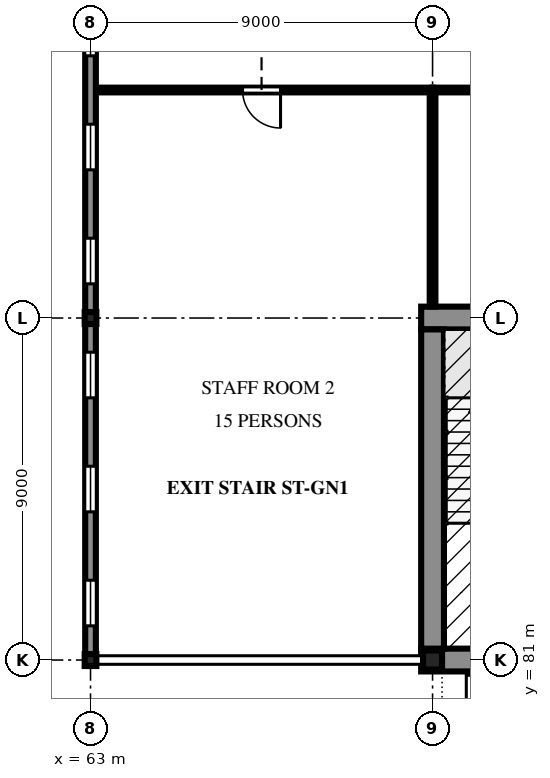
"""IFC4 building model, lengths in metres.
Left out: names, types, materials, properties, quantities, classifications, styles, units other than length and angle.
Written with IfcOpenShell. Run it as: python <this file> out.ifc"""

import sys

from ifc_helpers import new_model, si_unit, direction, frame, frame_2d, origin, origin_2d, place, context, subcontext, project, spatial, polyline, rectangle, hollow_rectangle, i_section, outline, extrude, element, fill, save


model = new_model("IFC4")
c1 = context("Model", 3, precision=1e-05, world=origin(), true_north=direction((0.0, 1.0)))
c2 = subcontext(c1, "Body", "Model", "MODEL_VIEW")
j1 = project(units=[si_unit("LENGTHUNIT", "METRE"), si_unit("PLANEANGLEUNIT", "RADIAN")], contexts=[c1])
p1 = place(None, origin())
s1 = spatial("IfcSite", under=j1, at=p1, CompositionType="ELEMENT")
p2 = place(p1, origin())
s2 = spatial("IfcBuilding", under=s1, at=p2, CompositionType="ELEMENT")
p3 = place(p2, frame((0.0, 0.0, 7.5)))
s3 = spatial("IfcBuildingStorey", under=s2, at=p3, CompositionType="ELEMENT", Elevation=7.5)
for number, where, z_axis, x_axis in (
    (1, (63.0, 81.0, 0.0), (0.0, 0.0, 1.0), (1.0, 0.0, 0.0)),
    (2, (63.0, 90.0, 0.0), (0.0, 0.0, 1.0), (1.0, 0.0, 0.0)),
):
    element("IfcColumn", number, at=place(p3, frame(where, z_axis=z_axis, x_axis=x_axis)), inside=s3, PredefinedType="COLUMN", context=c2, shape_type="SweptSolid", body=[
        extrude(i_section(OverallWidth=0.307, OverallDepth=0.314, WebThickness=0.012, FlangeThickness=0.019, FilletRadius=0.015, at=origin_2d()), origin(), (0.0, 0.0, 1.0), 4.2),
    ])
p4 = place(p3, frame((72.0, 81.0, 0.0), z_axis=(0.0, 0.0, 1.0), x_axis=(1.0, 0.0, 0.0)))
e3 = element("IfcColumn", 3, at=p4, inside=s3, PredefinedType="COLUMN", context=c2, shape_type="SweptSolid", body=[
    extrude(hollow_rectangle(XDim=0.5, YDim=0.5, WallThickness=0.032, at=origin_2d()), origin(), (0.0, 0.0, 1.0), 4.2),
])
p5 = place(p3, frame((71.7, 81.0, 0.0), z_axis=(0.0, 0.0, 1.0), x_axis=(1.0, 0.0, 0.0)))
e4 = element("IfcWall", 4, at=p5, inside=s3, PredefinedType="SOLIDWALL", context=c2, shape_type="SweptSolid", body=[
    extrude(rectangle(XDim=18.6, YDim=0.6, at=frame_2d((9.3, 0.0))), origin(), (0.0, 0.0, 1.0), 4.2),
])
p6 = place(p5, frame((1.6, 0.0, 0.0)))
e5 = element("IfcOpeningElement", 5, at=p6, cuts=e4, PredefinedType="OPENING", context=c2, shape_type="SweptSolid", body=[
    extrude(rectangle(XDim=1.8, YDim=2.1, at=frame_2d((0.9, 1.05))), frame((0.0, 0.31, 0.0), z_axis=(0.0, -1.0, 0.0), x_axis=(1.0, 0.0, 0.0)), (0.0, 0.0, 1.0), 0.62),
])
p7 = place(p5, frame((5.6, 0.0, 0.0)))
e6 = element("IfcOpeningElement", 6, at=p7, cuts=e4, PredefinedType="OPENING", context=c2, shape_type="SweptSolid", body=[
    extrude(rectangle(XDim=1.8, YDim=2.1, at=frame_2d((0.9, 1.05))), frame((0.0, 0.31, 0.0), z_axis=(0.0, -1.0, 0.0), x_axis=(1.0, 0.0, 0.0)), (0.0, 0.0, 1.0), 0.62),
])
p8 = place(p5, frame((9.1, 0.0, 0.0)))
e7 = element("IfcOpeningElement", 7, at=p8, cuts=e4, PredefinedType="OPENING", context=c2, shape_type="SweptSolid", body=[
    extrude(rectangle(XDim=1.8, YDim=2.1, at=frame_2d((0.9, 1.05))), frame((0.0, 0.31, 0.0), z_axis=(0.0, -1.0, 0.0), x_axis=(1.0, 0.0, 0.0)), (0.0, 0.0, 1.0), 0.62),
])
p9 = place(p3, frame((71.7, 90.0, 0.0), z_axis=(0.0, 0.0, 1.0), x_axis=(1.0, 0.0, 0.0)))
e8 = element("IfcWall", 8, at=p9, inside=s3, PredefinedType="SOLIDWALL", context=c2, shape_type="SweptSolid", body=[
    extrude(rectangle(XDim=18.6, YDim=0.6, at=frame_2d((9.3, 0.0))), origin(), (0.0, 0.0, 1.0), 4.2),
])
p10 = place(p3, frame((72.0, 81.3, 0.0), z_axis=(0.0, 0.0, 1.0), x_axis=(0.0, 1.0, 0.0)))
e9 = element("IfcWall", 9, at=p10, inside=s3, PredefinedType="SOLIDWALL", context=c2, shape_type="SweptSolid", body=[
    extrude(rectangle(XDim=8.4, YDim=0.6, at=frame_2d((4.2, 0.0))), origin(), (0.0, 0.0, 1.0), 4.2),
])
p11 = place(p3, frame((63.0, 81.157, 0.0), z_axis=(0.0, 0.0, 1.0), x_axis=(0.0, 1.0, 0.0)))
e10 = element("IfcWall", 10, at=p11, inside=s3, PredefinedType="SOLIDWALL", context=c2, shape_type="SweptSolid", body=[
    extrude(rectangle(XDim=8.686, YDim=0.28, at=frame_2d((4.343, 0.0))), origin(), (0.0, 0.0, 1.0), 3.517),
])
p12 = place(p11, frame((0.743, 0.0, 0.9)))
e11 = element("IfcOpeningElement", 11, at=p12, cuts=e10, PredefinedType="OPENING", context=c2, shape_type="SweptSolid", body=[
    extrude(rectangle(XDim=1.2, YDim=2.4, at=frame_2d((0.6, 1.2))), frame((0.0, 0.15, 0.0), z_axis=(0.0, -1.0, 0.0), x_axis=(1.0, 0.0, 0.0)), (0.0, 0.0, 1.0), 0.3),
])
p13 = place(p11, frame((3.743, 0.0, 0.9)))
e12 = element("IfcOpeningElement", 12, at=p13, cuts=e10, PredefinedType="OPENING", context=c2, shape_type="SweptSolid", body=[
    extrude(rectangle(XDim=1.2, YDim=2.4, at=frame_2d((0.6, 1.2))), frame((0.0, 0.15, 0.0), z_axis=(0.0, -1.0, 0.0), x_axis=(1.0, 0.0, 0.0)), (0.0, 0.0, 1.0), 0.3),
])
p14 = place(p11, frame((6.743, 0.0, 0.9)))
e13 = element("IfcOpeningElement", 13, at=p14, cuts=e10, PredefinedType="OPENING", context=c2, shape_type="SweptSolid", body=[
    extrude(rectangle(XDim=1.2, YDim=2.4, at=frame_2d((0.6, 1.2))), frame((0.0, 0.15, 0.0), z_axis=(0.0, -1.0, 0.0), x_axis=(1.0, 0.0, 0.0)), (0.0, 0.0, 1.0), 0.3),
])
p15 = place(p3, frame((63.0, 90.157, 0.0), z_axis=(0.0, 0.0, 1.0), x_axis=(0.0, 1.0, 0.0)))
e14 = element("IfcWall", 14, at=p15, inside=s3, PredefinedType="SOLIDWALL", context=c2, shape_type="SweptSolid", body=[
    extrude(rectangle(XDim=8.686, YDim=0.28, at=frame_2d((4.343, 0.0))), origin(), (0.0, 0.0, 1.0), 3.517),
])
p16 = place(p15, frame((0.743, 0.0, 0.9)))
e15 = element("IfcOpeningElement", 15, at=p16, cuts=e14, PredefinedType="OPENING", context=c2, shape_type="SweptSolid", body=[
    extrude(rectangle(XDim=1.2, YDim=2.4, at=frame_2d((0.6, 1.2))), frame((0.0, 0.15, 0.0), z_axis=(0.0, -1.0, 0.0), x_axis=(1.0, 0.0, 0.0)), (0.0, 0.0, 1.0), 0.3),
])
p17 = place(p15, frame((3.743, 0.0, 0.9)))
e16 = element("IfcOpeningElement", 16, at=p17, cuts=e14, PredefinedType="OPENING", context=c2, shape_type="SweptSolid", body=[
    extrude(rectangle(XDim=1.2, YDim=2.4, at=frame_2d((0.6, 1.2))), frame((0.0, 0.15, 0.0), z_axis=(0.0, -1.0, 0.0), x_axis=(1.0, 0.0, 0.0)), (0.0, 0.0, 1.0), 0.3),
])
p18 = place(p15, frame((6.743, 0.0, 0.9)))
e17 = element("IfcOpeningElement", 17, at=p18, cuts=e14, PredefinedType="OPENING", context=c2, shape_type="SweptSolid", body=[
    extrude(rectangle(XDim=1.2, YDim=2.4, at=frame_2d((0.6, 1.2))), frame((0.0, 0.15, 0.0), z_axis=(0.0, -1.0, 0.0), x_axis=(1.0, 0.0, 0.0)), (0.0, 0.0, 1.0), 0.3),
])
p19 = place(p3, frame((72.0, 96.0, 0.0), z_axis=(0.0, 0.0, 1.0), x_axis=(-1.0, 0.0, 0.0)))
e18 = element("IfcWall", 18, at=p19, inside=s3, PredefinedType="PARTITIONING", context=c2, shape_type="SweptSolid", body=[
    extrude(rectangle(XDim=8.858, YDim=0.125, at=frame_2d((4.429, 0.0))), origin(), (0.0, 0.0, 1.0), 3.307),
])
p20 = place(p19, frame((4.0, 0.0, 0.0)))
e19 = element("IfcOpeningElement", 19, at=p20, cuts=e18, PredefinedType="OPENING", context=c2, shape_type="SweptSolid", body=[
    extrude(rectangle(XDim=1.0, YDim=2.1, at=frame_2d((0.5, 1.05))), frame((0.0, 0.073, 0.0), z_axis=(0.0, -1.0, 0.0), x_axis=(1.0, 0.0, 0.0)), (0.0, 0.0, 1.0), 0.145),
])
p21 = place(p3, frame((81.0, 96.0, 0.0), z_axis=(0.0, 0.0, 1.0), x_axis=(-1.0, 0.0, 0.0)))
e20 = element("IfcWall", 20, at=p21, inside=s3, PredefinedType="PARTITIONING", context=c2, shape_type="SweptSolid", body=[
    extrude(rectangle(XDim=9.0, YDim=0.125, at=frame_2d((4.5, 0.0))), origin(), (0.0, 0.0, 1.0), 3.307),
])
p22 = place(p21, frame((4.0, 0.0, 0.0)))
e21 = element("IfcOpeningElement", 21, at=p22, cuts=e20, PredefinedType="OPENING", context=c2, shape_type="SweptSolid", body=[
    extrude(rectangle(XDim=1.0, YDim=2.1, at=frame_2d((0.5, 1.05))), frame((0.0, 0.073, 0.0), z_axis=(0.0, -1.0, 0.0), x_axis=(1.0, 0.0, 0.0)), (0.0, 0.0, 1.0), 0.145),
])
p23 = place(p3, frame((72.0, 95.938, 0.0), z_axis=(0.0, 0.0, 1.0), x_axis=(0.0, -1.0, 0.0)))
e22 = element("IfcWall", 22, at=p23, inside=s3, PredefinedType="PARTITIONING", context=c2, shape_type="SweptSolid", body=[
    extrude(rectangle(XDim=5.635, YDim=0.15, at=frame_2d((2.818, 0.0))), origin(), (0.0, 0.0, 1.0), 3.307),
])
p24 = place(p12, origin())
e23 = element("IfcWindow", 23, at=p24, inside=s3, PartitioningType="DOUBLE_PANEL_HORIZONTAL", PredefinedType="WINDOW", context=c2, shape_type="SweptSolid", body=[
    extrude(outline(polyline([(0.0, 0.0), (1.2, 0.0), (1.2, 2.4), (0.0, 2.4), (0.0, 0.0)]), holes=[polyline([(0.07, 0.07), (1.13, 0.07), (1.13, 2.33), (0.07, 2.33), (0.07, 0.07)])]), frame((0.0, 0.03, 0.0), z_axis=(0.0, -1.0, 0.0), x_axis=(1.0, 0.0, 0.0)), (0.0, 0.0, 1.0), 0.06),
    extrude(rectangle(XDim=1.06, YDim=0.04, at=frame_2d((0.6, 1.2))), frame((0.0, 0.021, 0.0), z_axis=(0.0, -1.0, 0.0), x_axis=(1.0, 0.0, 0.0)), (0.0, 0.0, 1.0), 0.043),
    extrude(outline(polyline([(0.07, 0.07), (1.13, 0.07), (1.13, 1.18), (0.07, 1.18), (0.07, 0.07)]), holes=[polyline([(0.1, 0.1), (1.1, 0.1), (1.1, 1.15), (0.1, 1.15), (0.1, 0.1)])]), frame((0.0, 0.022, 0.0), z_axis=(0.0, -1.0, 0.0), x_axis=(1.0, 0.0, 0.0)), (0.0, 0.0, 1.0), 0.045),
    extrude(rectangle(XDim=1.0, YDim=1.05, at=frame_2d((0.6, 0.625))), frame((0.0, 0.006, 0.0), z_axis=(0.0, -1.0, 0.0), x_axis=(1.0, 0.0, 0.0)), (0.0, 0.0, 1.0), 0.012),
    extrude(outline(polyline([(0.07, 1.22), (1.13, 1.22), (1.13, 2.33), (0.07, 2.33), (0.07, 1.22)]), holes=[polyline([(0.1, 1.25), (1.1, 1.25), (1.1, 2.3), (0.1, 2.3), (0.1, 1.25)])]), frame((0.0, 0.022, 0.0), z_axis=(0.0, -1.0, 0.0), x_axis=(1.0, 0.0, 0.0)), (0.0, 0.0, 1.0), 0.045),
    extrude(rectangle(XDim=1.0, YDim=1.05, at=frame_2d((0.6, 1.775))), frame((0.0, 0.006, 0.0), z_axis=(0.0, -1.0, 0.0), x_axis=(1.0, 0.0, 0.0)), (0.0, 0.0, 1.0), 0.012),
])
fill(e11, e23)
p25 = place(p13, origin())
e24 = element("IfcWindow", 24, at=p25, inside=s3, PartitioningType="DOUBLE_PANEL_HORIZONTAL", PredefinedType="WINDOW", context=c2, shape_type="SweptSolid", body=[
    extrude(outline(polyline([(0.0, 0.0), (1.2, 0.0), (1.2, 2.4), (0.0, 2.4), (0.0, 0.0)]), holes=[polyline([(0.07, 0.07), (1.13, 0.07), (1.13, 2.33), (0.07, 2.33), (0.07, 0.07)])]), frame((0.0, 0.03, 0.0), z_axis=(0.0, -1.0, 0.0), x_axis=(1.0, 0.0, 0.0)), (0.0, 0.0, 1.0), 0.06),
    extrude(rectangle(XDim=1.06, YDim=0.04, at=frame_2d((0.6, 1.2))), frame((0.0, 0.021, 0.0), z_axis=(0.0, -1.0, 0.0), x_axis=(1.0, 0.0, 0.0)), (0.0, 0.0, 1.0), 0.043),
    extrude(outline(polyline([(0.07, 0.07), (1.13, 0.07), (1.13, 1.18), (0.07, 1.18), (0.07, 0.07)]), holes=[polyline([(0.1, 0.1), (1.1, 0.1), (1.1, 1.15), (0.1, 1.15), (0.1, 0.1)])]), frame((0.0, 0.022, 0.0), z_axis=(0.0, -1.0, 0.0), x_axis=(1.0, 0.0, 0.0)), (0.0, 0.0, 1.0), 0.045),
    extrude(rectangle(XDim=1.0, YDim=1.05, at=frame_2d((0.6, 0.625))), frame((0.0, 0.006, 0.0), z_axis=(0.0, -1.0, 0.0), x_axis=(1.0, 0.0, 0.0)), (0.0, 0.0, 1.0), 0.012),
    extrude(outline(polyline([(0.07, 1.22), (1.13, 1.22), (1.13, 2.33), (0.07, 2.33), (0.07, 1.22)]), holes=[polyline([(0.1, 1.25), (1.1, 1.25), (1.1, 2.3), (0.1, 2.3), (0.1, 1.25)])]), frame((0.0, 0.022, 0.0), z_axis=(0.0, -1.0, 0.0), x_axis=(1.0, 0.0, 0.0)), (0.0, 0.0, 1.0), 0.045),
    extrude(rectangle(XDim=1.0, YDim=1.05, at=frame_2d((0.6, 1.775))), frame((0.0, 0.006, 0.0), z_axis=(0.0, -1.0, 0.0), x_axis=(1.0, 0.0, 0.0)), (0.0, 0.0, 1.0), 0.012),
])
fill(e12, e24)
p26 = place(p14, origin())
e25 = element("IfcWindow", 25, at=p26, inside=s3, PartitioningType="DOUBLE_PANEL_HORIZONTAL", PredefinedType="WINDOW", context=c2, shape_type="SweptSolid", body=[
    extrude(outline(polyline([(0.0, 0.0), (1.2, 0.0), (1.2, 2.4), (0.0, 2.4), (0.0, 0.0)]), holes=[polyline([(0.07, 0.07), (1.13, 0.07), (1.13, 2.33), (0.07, 2.33), (0.07, 0.07)])]), frame((0.0, 0.03, 0.0), z_axis=(0.0, -1.0, 0.0), x_axis=(1.0, 0.0, 0.0)), (0.0, 0.0, 1.0), 0.06),
    extrude(rectangle(XDim=1.06, YDim=0.04, at=frame_2d((0.6, 1.2))), frame((0.0, 0.021, 0.0), z_axis=(0.0, -1.0, 0.0), x_axis=(1.0, 0.0, 0.0)), (0.0, 0.0, 1.0), 0.043),
    extrude(outline(polyline([(0.07, 0.07), (1.13, 0.07), (1.13, 1.18), (0.07, 1.18), (0.07, 0.07)]), holes=[polyline([(0.1, 0.1), (1.1, 0.1), (1.1, 1.15), (0.1, 1.15), (0.1, 0.1)])]), frame((0.0, 0.022, 0.0), z_axis=(0.0, -1.0, 0.0), x_axis=(1.0, 0.0, 0.0)), (0.0, 0.0, 1.0), 0.045),
    extrude(rectangle(XDim=1.0, YDim=1.05, at=frame_2d((0.6, 0.625))), frame((0.0, 0.006, 0.0), z_axis=(0.0, -1.0, 0.0), x_axis=(1.0, 0.0, 0.0)), (0.0, 0.0, 1.0), 0.012),
    extrude(outline(polyline([(0.07, 1.22), (1.13, 1.22), (1.13, 2.33), (0.07, 2.33), (0.07, 1.22)]), holes=[polyline([(0.1, 1.25), (1.1, 1.25), (1.1, 2.3), (0.1, 2.3), (0.1, 1.25)])]), frame((0.0, 0.022, 0.0), z_axis=(0.0, -1.0, 0.0), x_axis=(1.0, 0.0, 0.0)), (0.0, 0.0, 1.0), 0.045),
    extrude(rectangle(XDim=1.0, YDim=1.05, at=frame_2d((0.6, 1.775))), frame((0.0, 0.006, 0.0), z_axis=(0.0, -1.0, 0.0), x_axis=(1.0, 0.0, 0.0)), (0.0, 0.0, 1.0), 0.012),
])
fill(e13, e25)
p27 = place(p16, origin())
e26 = element("IfcWindow", 26, at=p27, inside=s3, PartitioningType="DOUBLE_PANEL_HORIZONTAL", PredefinedType="WINDOW", context=c2, shape_type="SweptSolid", body=[
    extrude(outline(polyline([(0.0, 0.0), (1.2, 0.0), (1.2, 2.4), (0.0, 2.4), (0.0, 0.0)]), holes=[polyline([(0.07, 0.07), (1.13, 0.07), (1.13, 2.33), (0.07, 2.33), (0.07, 0.07)])]), frame((0.0, 0.03, 0.0), z_axis=(0.0, -1.0, 0.0), x_axis=(1.0, 0.0, 0.0)), (0.0, 0.0, 1.0), 0.06),
    extrude(rectangle(XDim=1.06, YDim=0.04, at=frame_2d((0.6, 1.2))), frame((0.0, 0.021, 0.0), z_axis=(0.0, -1.0, 0.0), x_axis=(1.0, 0.0, 0.0)), (0.0, 0.0, 1.0), 0.043),
    extrude(outline(polyline([(0.07, 0.07), (1.13, 0.07), (1.13, 1.18), (0.07, 1.18), (0.07, 0.07)]), holes=[polyline([(0.1, 0.1), (1.1, 0.1), (1.1, 1.15), (0.1, 1.15), (0.1, 0.1)])]), frame((0.0, 0.022, 0.0), z_axis=(0.0, -1.0, 0.0), x_axis=(1.0, 0.0, 0.0)), (0.0, 0.0, 1.0), 0.045),
    extrude(rectangle(XDim=1.0, YDim=1.05, at=frame_2d((0.6, 0.625))), frame((0.0, 0.006, 0.0), z_axis=(0.0, -1.0, 0.0), x_axis=(1.0, 0.0, 0.0)), (0.0, 0.0, 1.0), 0.012),
    extrude(outline(polyline([(0.07, 1.22), (1.13, 1.22), (1.13, 2.33), (0.07, 2.33), (0.07, 1.22)]), holes=[polyline([(0.1, 1.25), (1.1, 1.25), (1.1, 2.3), (0.1, 2.3), (0.1, 1.25)])]), frame((0.0, 0.022, 0.0), z_axis=(0.0, -1.0, 0.0), x_axis=(1.0, 0.0, 0.0)), (0.0, 0.0, 1.0), 0.045),
    extrude(rectangle(XDim=1.0, YDim=1.05, at=frame_2d((0.6, 1.775))), frame((0.0, 0.006, 0.0), z_axis=(0.0, -1.0, 0.0), x_axis=(1.0, 0.0, 0.0)), (0.0, 0.0, 1.0), 0.012),
])
fill(e15, e26)
p28 = place(p17, origin())
e27 = element("IfcWindow", 27, at=p28, inside=s3, PartitioningType="DOUBLE_PANEL_HORIZONTAL", PredefinedType="WINDOW", context=c2, shape_type="SweptSolid", body=[
    extrude(outline(polyline([(0.0, 0.0), (1.2, 0.0), (1.2, 2.4), (0.0, 2.4), (0.0, 0.0)]), holes=[polyline([(0.07, 0.07), (1.13, 0.07), (1.13, 2.33), (0.07, 2.33), (0.07, 0.07)])]), frame((0.0, 0.03, 0.0), z_axis=(0.0, -1.0, 0.0), x_axis=(1.0, 0.0, 0.0)), (0.0, 0.0, 1.0), 0.06),
    extrude(rectangle(XDim=1.06, YDim=0.04, at=frame_2d((0.6, 1.2))), frame((0.0, 0.021, 0.0), z_axis=(0.0, -1.0, 0.0), x_axis=(1.0, 0.0, 0.0)), (0.0, 0.0, 1.0), 0.043),
    extrude(outline(polyline([(0.07, 0.07), (1.13, 0.07), (1.13, 1.18), (0.07, 1.18), (0.07, 0.07)]), holes=[polyline([(0.1, 0.1), (1.1, 0.1), (1.1, 1.15), (0.1, 1.15), (0.1, 0.1)])]), frame((0.0, 0.022, 0.0), z_axis=(0.0, -1.0, 0.0), x_axis=(1.0, 0.0, 0.0)), (0.0, 0.0, 1.0), 0.045),
    extrude(rectangle(XDim=1.0, YDim=1.05, at=frame_2d((0.6, 0.625))), frame((0.0, 0.006, 0.0), z_axis=(0.0, -1.0, 0.0), x_axis=(1.0, 0.0, 0.0)), (0.0, 0.0, 1.0), 0.012),
    extrude(outline(polyline([(0.07, 1.22), (1.13, 1.22), (1.13, 2.33), (0.07, 2.33), (0.07, 1.22)]), holes=[polyline([(0.1, 1.25), (1.1, 1.25), (1.1, 2.3), (0.1, 2.3), (0.1, 1.25)])]), frame((0.0, 0.022, 0.0), z_axis=(0.0, -1.0, 0.0), x_axis=(1.0, 0.0, 0.0)), (0.0, 0.0, 1.0), 0.045),
    extrude(rectangle(XDim=1.0, YDim=1.05, at=frame_2d((0.6, 1.775))), frame((0.0, 0.006, 0.0), z_axis=(0.0, -1.0, 0.0), x_axis=(1.0, 0.0, 0.0)), (0.0, 0.0, 1.0), 0.012),
])
fill(e16, e27)
p29 = place(p18, origin())
e28 = element("IfcWindow", 28, at=p29, inside=s3, PartitioningType="DOUBLE_PANEL_HORIZONTAL", PredefinedType="WINDOW", context=c2, shape_type="SweptSolid", body=[
    extrude(outline(polyline([(0.0, 0.0), (1.2, 0.0), (1.2, 2.4), (0.0, 2.4), (0.0, 0.0)]), holes=[polyline([(0.07, 0.07), (1.13, 0.07), (1.13, 2.33), (0.07, 2.33), (0.07, 0.07)])]), frame((0.0, 0.03, 0.0), z_axis=(0.0, -1.0, 0.0), x_axis=(1.0, 0.0, 0.0)), (0.0, 0.0, 1.0), 0.06),
    extrude(rectangle(XDim=1.06, YDim=0.04, at=frame_2d((0.6, 1.2))), frame((0.0, 0.021, 0.0), z_axis=(0.0, -1.0, 0.0), x_axis=(1.0, 0.0, 0.0)), (0.0, 0.0, 1.0), 0.043),
    extrude(outline(polyline([(0.07, 0.07), (1.13, 0.07), (1.13, 1.18), (0.07, 1.18), (0.07, 0.07)]), holes=[polyline([(0.1, 0.1), (1.1, 0.1), (1.1, 1.15), (0.1, 1.15), (0.1, 0.1)])]), frame((0.0, 0.022, 0.0), z_axis=(0.0, -1.0, 0.0), x_axis=(1.0, 0.0, 0.0)), (0.0, 0.0, 1.0), 0.045),
    extrude(rectangle(XDim=1.0, YDim=1.05, at=frame_2d((0.6, 0.625))), frame((0.0, 0.006, 0.0), z_axis=(0.0, -1.0, 0.0), x_axis=(1.0, 0.0, 0.0)), (0.0, 0.0, 1.0), 0.012),
    extrude(outline(polyline([(0.07, 1.22), (1.13, 1.22), (1.13, 2.33), (0.07, 2.33), (0.07, 1.22)]), holes=[polyline([(0.1, 1.25), (1.1, 1.25), (1.1, 2.3), (0.1, 2.3), (0.1, 1.25)])]), frame((0.0, 0.022, 0.0), z_axis=(0.0, -1.0, 0.0), x_axis=(1.0, 0.0, 0.0)), (0.0, 0.0, 1.0), 0.045),
    extrude(rectangle(XDim=1.0, YDim=1.05, at=frame_2d((0.6, 1.775))), frame((0.0, 0.006, 0.0), z_axis=(0.0, -1.0, 0.0), x_axis=(1.0, 0.0, 0.0)), (0.0, 0.0, 1.0), 0.012),
])
fill(e17, e28)
p30 = place(p20, origin())
e29 = element("IfcDoor", 29, at=p30, inside=s3, OperationType="SINGLE_SWING_LEFT", PredefinedType="DOOR", context=c2, shape_type="SweptSolid", body=[
    extrude(outline(polyline([(0.0, 0.0), (0.07, 0.0), (0.07, 2.03), (0.93, 2.03), (0.93, 0.0), (1.0, 0.0), (1.0, 2.1), (0.0, 2.1), (0.0, 0.0)])), frame((0.0, 0.025, 0.0), z_axis=(0.0, -1.0, 0.0), x_axis=(1.0, 0.0, 0.0)), (0.0, 0.0, 1.0), 0.05),
    extrude(outline(polyline([(0.074, 0.01), (0.926, 0.01), (0.926, 2.026), (0.074, 2.026), (0.074, 0.01)]), holes=[polyline([(0.194, 0.16), (0.806, 0.16), (0.806, 1.01), (0.194, 1.01), (0.194, 0.16)]), polyline([(0.35, 1.16), (0.65, 1.16), (0.65, 1.76), (0.35, 1.76), (0.35, 1.16)])]), frame((0.0, 0.017, 0.0), z_axis=(0.0, -1.0, 0.0), x_axis=(1.0, 0.0, 0.0)), (0.0, 0.0, 1.0), 0.035),
    extrude(rectangle(XDim=0.612, YDim=0.85, at=frame_2d((0.5, 0.585))), frame((0.0, 0.009, 0.0), z_axis=(0.0, -1.0, 0.0), x_axis=(1.0, 0.0, 0.0)), (0.0, 0.0, 1.0), 0.017),
    extrude(rectangle(XDim=0.3, YDim=0.6, at=frame_2d((0.5, 1.46))), frame((0.0, 0.006, 0.0), z_axis=(0.0, -1.0, 0.0), x_axis=(1.0, 0.0, 0.0)), (0.0, 0.0, 1.0), 0.012),
])
fill(e19, e29)
save(model, sys.argv[1])
